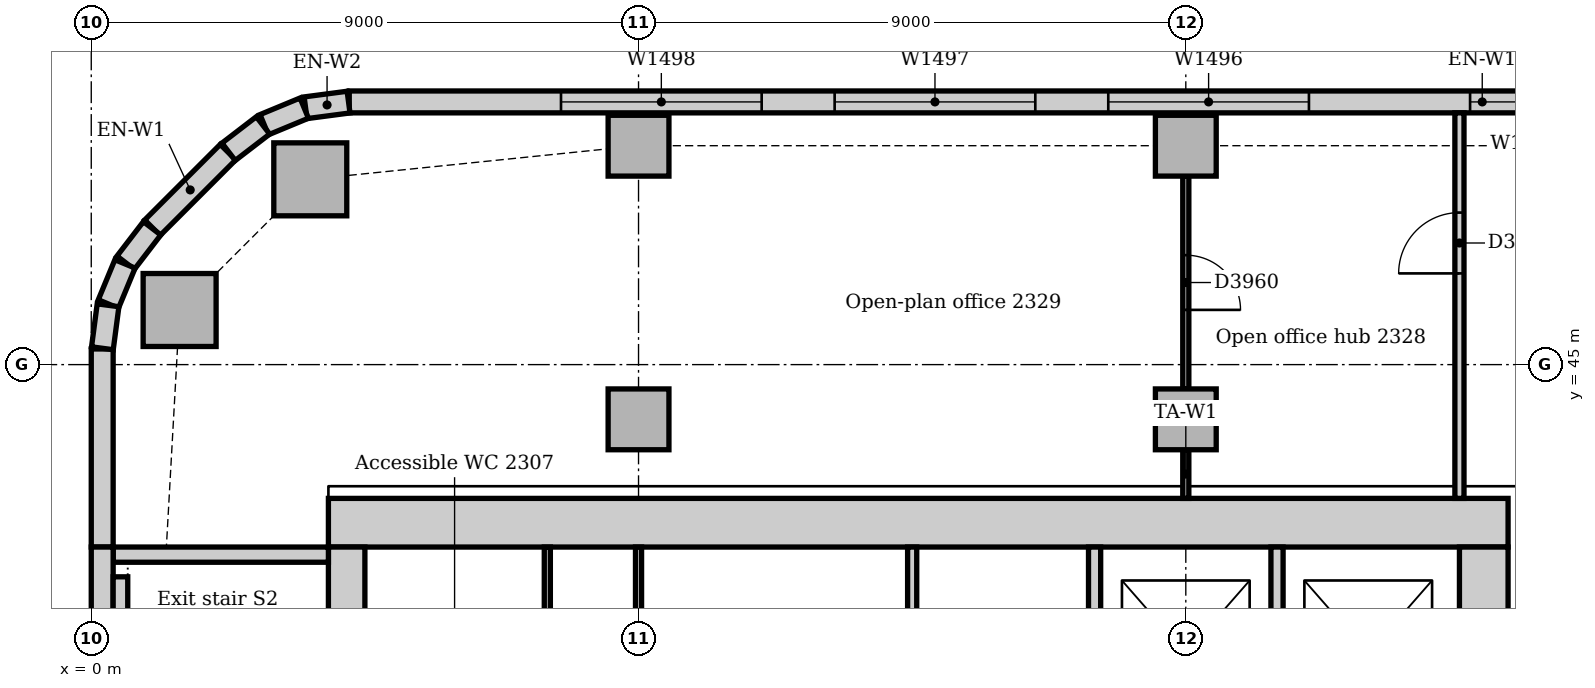
"""IFC4 building model, lengths in metres.
Left out: names, types, materials, properties, quantities, classifications, styles, units other than length and angle.
Written with IfcOpenShell. Run it as: python <this file> out.ifc"""

import sys

from ifc_helpers import new_model, si_unit, direction, frame, frame_2d, origin, origin_2d, place, context, subcontext, project, spatial, rectangle, extrude, element, fill, save


model = new_model("IFC4")
c1 = context("Model", 3, precision=1e-05, world=origin(), true_north=direction((0.0, 1.0)))
c2 = subcontext(c1, "Body", "Model", "MODEL_VIEW")
j1 = project(units=[si_unit("LENGTHUNIT", "METRE"), si_unit("PLANEANGLEUNIT", "RADIAN")], contexts=[c1])
p1 = place(None, origin())
s1 = spatial("IfcSite", under=j1, at=p1, CompositionType="ELEMENT")
p2 = place(p1, origin())
s2 = spatial("IfcBuilding", under=s1, at=p2, CompositionType="ELEMENT")
p3 = place(p2, frame((0.0, 0.0, 100.0)))
s3 = spatial("IfcBuildingStorey", under=s2, at=p3, CompositionType="ELEMENT", Elevation=100.0)
p4 = place(p3, frame((23.3, 42.4, 0.0), z_axis=(0.0, 0.0, 1.0), x_axis=(-1.0, 0.0, 0.0)))
e1 = element("IfcWall", 1, at=p4, inside=s3, PredefinedType="SOLIDWALL", context=c2, shape_type="SweptSolid", body=[
    extrude(rectangle(XDim=19.4, YDim=0.8, at=frame_2d((9.7, 0.0))), origin(), (0.0, 0.0, 1.0), 4.0),
])
p5 = place(p3, frame((22.9, 31.5, 0.0), z_axis=(0.0, 0.0, 1.0), x_axis=(0.0, 1.0, 0.0)))
e2 = element("IfcWall", 2, at=p5, inside=s3, PredefinedType="SOLIDWALL", context=c2, shape_type="SweptSolid", body=[
    extrude(rectangle(XDim=10.5, YDim=0.8, at=frame_2d((5.25, 0.0))), origin(), (0.0, 0.0, 1.0), 4.0),
])
p6 = place(p5, frame((3.15, 0.0, 0.0)))
e3 = element("IfcOpeningElement", 3, at=p6, cuts=e2, PredefinedType="OPENING", context=c2, shape_type="SweptSolid", body=[
    extrude(rectangle(XDim=1.0, YDim=2.1, at=frame_2d((0.5, 1.05))), frame((0.0, 0.41, 0.0), z_axis=(0.0, -1.0, 0.0), x_axis=(1.0, 0.0, 0.0)), (0.0, 0.0, 1.0), 0.82),
])
p7 = place(p5, frame((5.2, 0.0, 0.0)))
e4 = element("IfcOpeningElement", 4, at=p7, cuts=e2, PredefinedType="OPENING", context=c2, shape_type="SweptSolid", body=[
    extrude(rectangle(XDim=1.0, YDim=2.1, at=frame_2d((0.5, 1.05))), frame((0.0, 0.41, 0.0), z_axis=(0.0, -1.0, 0.0), x_axis=(1.0, 0.0, 0.0)), (0.0, 0.0, 1.0), 0.82),
])
p8 = place(p3, frame((4.2, 42.0, 0.0), z_axis=(0.0, 0.0, 1.0), x_axis=(0.0, -1.0, 0.0)))
e5 = element("IfcWall", 5, at=p8, inside=s3, PredefinedType="SOLIDWALL", context=c2, shape_type="SweptSolid", body=[
    extrude(rectangle(XDim=10.5, YDim=0.6, at=frame_2d((5.25, 0.0))), origin(), (0.0, 0.0, 1.0), 4.0),
])
p9 = place(p8, frame((5.3, 0.0, 0.0)))
e6 = element("IfcOpeningElement", 6, at=p9, cuts=e5, PredefinedType="OPENING", context=c2, shape_type="SweptSolid", body=[
    extrude(rectangle(XDim=1.0, YDim=2.1, at=frame_2d((0.5, 1.05))), frame((0.0, 0.31, 0.0), z_axis=(0.0, -1.0, 0.0), x_axis=(1.0, 0.0, 0.0)), (0.0, 0.0, 1.0), 0.62),
])
p10 = place(p3, frame((3.9, 41.875, 0.0), z_axis=(0.0, 0.0, 1.0), x_axis=(-1.0, 0.0, 0.0)))
e7 = element("IfcWall", 7, at=p10, inside=s3, PredefinedType="SOLIDWALL", context=c2, shape_type="SweptSolid", body=[
    extrude(rectangle(XDim=3.54, YDim=0.25, at=frame_2d((1.77, 0.0))), origin(), (0.0, 0.0, 1.0), 4.0),
])
for number, where, z_axis, x_axis in (
    (8, (3.602, 48.047, -0.15), (0.0, 0.0, 1.0), (1.0, 0.0, 0.0)),
    (9, (1.453, 45.898, -0.15), (0.0, 0.0, 1.0), (1.0, 0.0, 0.0)),
):
    element("IfcColumn", number, at=place(p3, frame(where, z_axis=z_axis, x_axis=x_axis)), inside=s3, PredefinedType="COLUMN", context=c2, shape_type="SweptSolid", body=[
        extrude(rectangle(XDim=1.2, YDim=1.2, at=origin_2d()), origin(), (0.0, 0.0, 1.0), 4.0),
    ])
for number, where, z_axis, x_axis in (
    (10, (9.0, 48.6, -0.15), (0.0, 0.0, 1.0), (1.0, 0.0, 0.0)),
    (11, (18.0, 48.6, -0.15), (0.0, 0.0, 1.0), (1.0, 0.0, 0.0)),
):
    element("IfcColumn", number, at=place(p3, frame(where, z_axis=z_axis, x_axis=x_axis)), inside=s3, PredefinedType="COLUMN", context=c2, shape_type="SweptSolid", body=[
        extrude(rectangle(XDim=1.0, YDim=1.0, at=origin_2d()), origin(), (0.0, 0.0, 1.0), 4.0),
    ])
for number, where, z_axis, x_axis in (
    (12, (9.0, 44.1, 0.0), (0.0, 0.0, 1.0), (1.0, 0.0, 0.0)),
    (13, (18.0, 44.1, 0.0), (0.0, 0.0, 1.0), (1.0, 0.0, 0.0)),
):
    element("IfcColumn", number, at=place(p3, frame(where, z_axis=z_axis, x_axis=x_axis)), inside=s3, PredefinedType="COLUMN", context=c2, shape_type="SweptSolid", body=[
        extrude(rectangle(XDim=1.0, YDim=1.0, at=origin_2d()), origin(), (0.0, 0.0, 1.0), 3.85),
    ])
p11 = place(p3, frame((41.507, 49.32, 0.0), z_axis=(0.0, 0.0, 1.0), x_axis=(-1.0, 0.0, 0.0)))
e14 = element("IfcWall", 14, at=p11, inside=s3, PredefinedType="STANDARD", context=c2, shape_type="SweptSolid", body=[
    extrude(rectangle(XDim=37.265, YDim=0.36, at=frame_2d((18.632, 0.0))), origin(), (0.0, 0.0, 1.0), 3.85),
])
p12 = place(p11, frame((3.482, 0.0, 0.9)))
e15 = element("IfcOpeningElement", 15, at=p12, cuts=e14, PredefinedType="OPENING", context=c2, shape_type="SweptSolid", body=[
    extrude(rectangle(XDim=3.3, YDim=1.6, at=frame_2d((1.65, 0.8))), frame((0.0, 0.19, 0.0), z_axis=(0.0, -1.0, 0.0), x_axis=(1.0, 0.0, 0.0)), (0.0, 0.0, 1.0), 0.38),
])
p13 = place(p11, frame((7.982, 0.0, 0.9)))
e16 = element("IfcOpeningElement", 16, at=p13, cuts=e14, PredefinedType="OPENING", context=c2, shape_type="SweptSolid", body=[
    extrude(rectangle(XDim=3.3, YDim=1.6, at=frame_2d((1.65, 0.8))), frame((0.0, 0.19, 0.0), z_axis=(0.0, -1.0, 0.0), x_axis=(1.0, 0.0, 0.0)), (0.0, 0.0, 1.0), 0.38),
])
p14 = place(p11, frame((12.482, 0.0, 0.9)))
e17 = element("IfcOpeningElement", 17, at=p14, cuts=e14, PredefinedType="OPENING", context=c2, shape_type="SweptSolid", body=[
    extrude(rectangle(XDim=3.3, YDim=1.6, at=frame_2d((1.65, 0.8))), frame((0.0, 0.19, 0.0), z_axis=(0.0, -1.0, 0.0), x_axis=(1.0, 0.0, 0.0)), (0.0, 0.0, 1.0), 0.38),
])
p15 = place(p11, frame((17.032, 0.0, 0.9)))
e18 = element("IfcOpeningElement", 18, at=p15, cuts=e14, PredefinedType="OPENING", context=c2, shape_type="SweptSolid", body=[
    extrude(rectangle(XDim=1.8, YDim=1.6, at=frame_2d((0.9, 0.8))), frame((0.0, 0.19, 0.0), z_axis=(0.0, -1.0, 0.0), x_axis=(1.0, 0.0, 0.0)), (0.0, 0.0, 1.0), 0.38),
])
p16 = place(p11, frame((21.482, 0.0, 0.9)))
e19 = element("IfcOpeningElement", 19, at=p16, cuts=e14, PredefinedType="OPENING", context=c2, shape_type="SweptSolid", body=[
    extrude(rectangle(XDim=3.3, YDim=1.6, at=frame_2d((1.65, 0.8))), frame((0.0, 0.19, 0.0), z_axis=(0.0, -1.0, 0.0), x_axis=(1.0, 0.0, 0.0)), (0.0, 0.0, 1.0), 0.38),
])
p17 = place(p11, frame((25.982, 0.0, 0.9)))
e20 = element("IfcOpeningElement", 20, at=p17, cuts=e14, PredefinedType="OPENING", context=c2, shape_type="SweptSolid", body=[
    extrude(rectangle(XDim=3.3, YDim=1.6, at=frame_2d((1.65, 0.8))), frame((0.0, 0.19, 0.0), z_axis=(0.0, -1.0, 0.0), x_axis=(1.0, 0.0, 0.0)), (0.0, 0.0, 1.0), 0.38),
])
p18 = place(p11, frame((30.482, 0.0, 0.9)))
e21 = element("IfcOpeningElement", 21, at=p18, cuts=e14, PredefinedType="OPENING", context=c2, shape_type="SweptSolid", body=[
    extrude(rectangle(XDim=3.3, YDim=1.6, at=frame_2d((1.65, 0.8))), frame((0.0, 0.19, 0.0), z_axis=(0.0, -1.0, 0.0), x_axis=(1.0, 0.0, 0.0)), (0.0, 0.0, 1.0), 0.38),
])
p19 = place(p3, frame((2.249, 48.494, 0.0), z_axis=(0.0, 0.0, 1.0), x_axis=(-0.707106781187, -0.707106781187, 0.0)))
e22 = element("IfcWall", 22, at=p19, inside=s3, PredefinedType="STANDARD", context=c2, shape_type="SweptSolid", body=[
    extrude(rectangle(XDim=1.757, YDim=0.36, at=frame_2d((0.879, 0.0))), origin(), (0.0, 0.0, 1.0), 3.85),
])
p20 = place(p3, frame((0.18, 45.257, 0.0), z_axis=(0.0, 0.0, 1.0), x_axis=(0.0, -1.0, 0.0)))
e23 = element("IfcWall", 23, at=p20, inside=s3, PredefinedType="STANDARD", context=c2, shape_type="SweptSolid", body=[
    extrude(rectangle(XDim=3.257, YDim=0.36, at=frame_2d((1.629, 0.0))), origin(), (0.0, 0.0, 1.0), 3.85),
])
p21 = place(p3, frame((0.18, 42.0, 0.0), z_axis=(0.0, 0.0, 1.0), x_axis=(0.0, -1.0, 0.0)))
e24 = element("IfcWall", 24, at=p21, inside=s3, PredefinedType="STANDARD", context=c2, shape_type="SweptSolid", body=[
    extrude(rectangle(XDim=6.75, YDim=0.36, at=frame_2d((3.375, 0.0))), origin(), (0.0, 0.0, 1.0), 3.85),
])
for number, where, z_axis, x_axis in (
    (25, (4.231, 49.317, 0.0), (0.0, 0.0, 1.0), (-0.991, -0.131, 0.0)),
    (26, (3.503, 49.218, 0.0), (0.0, 0.0, 1.0), (-0.924, -0.383, 0.0)),
):
    element("IfcWall", number, at=place(p3, frame(where, z_axis=z_axis, x_axis=x_axis)), inside=s3, PredefinedType="STANDARD", context=c2, shape_type="SweptSolid", body=[
        extrude(rectangle(XDim=0.713, YDim=0.36, at=frame_2d((0.356, 0.0))), origin(), (0.0, 0.0, 1.0), 3.85),
    ])
for number, where, z_axis, x_axis in (
    (27, (2.825, 48.934, 0.0), (0.0, 0.0, 1.0), (-0.793, -0.609, 0.0)),
    (28, (1.0, 47.241, 0.0), (0.0, 0.0, 1.0), (-0.609, -0.793, 0.0)),
):
    element("IfcWall", number, at=place(p3, frame(where, z_axis=z_axis, x_axis=x_axis)), inside=s3, PredefinedType="STANDARD", context=c2, shape_type="SweptSolid", body=[
        extrude(rectangle(XDim=0.713, YDim=0.36, at=frame_2d((0.357, 0.0))), origin(), (0.0, 0.0, 1.0), 3.85),
    ])
for number, where, z_axis, x_axis in (
    (29, (0.555, 46.656, 0.0), (0.0, 0.0, 1.0), (-0.383, -0.924, 0.0)),
    (30, (0.276, 45.976, 0.0), (0.0, 0.0, 1.0), (-0.131, -0.991, 0.0)),
):
    element("IfcWall", number, at=place(p3, frame(where, z_axis=z_axis, x_axis=x_axis)), inside=s3, PredefinedType="STANDARD", context=c2, shape_type="SweptSolid", body=[
        extrude(rectangle(XDim=0.713, YDim=0.36, at=frame_2d((0.356, 0.0))), origin(), (0.0, 0.0, 1.0), 3.85),
    ])
p22 = place(p3, frame((0.48, 40.13, 0.0), z_axis=(0.0, 0.0, 1.0), x_axis=(0.0, 1.0, 0.0)))
e31 = element("IfcWall", 31, at=p22, inside=s3, PredefinedType="STANDARD", context=c2, shape_type="SweptSolid", body=[
    extrude(rectangle(XDim=1.38, YDim=0.24, at=frame_2d((0.69, 0.0))), origin(), (0.0, 0.0, 1.0), 4.0),
])
for number, where, z_axis, x_axis in (
    (32, (16.5, 38.6, 0.0), (0.0, 0.0, 1.0), (0.0, 1.0, 0.0)),
    (33, (19.5, 38.6, 0.0), (0.0, 0.0, 1.0), (0.0, 1.0, 0.0)),
):
    element("IfcWall", number, at=place(p3, frame(where, z_axis=z_axis, x_axis=x_axis)), inside=s3, PredefinedType="PARTITIONING", context=c2, shape_type="SweptSolid", body=[
        extrude(rectangle(XDim=3.4, YDim=0.2, at=frame_2d((1.7, 0.0))), origin(), (0.0, 0.0, 1.0), 3.85),
    ])
p23 = place(p3, frame((22.5, 42.8, 0.0), z_axis=(0.0, 0.0, 1.0), x_axis=(0.0, 1.0, 0.0)))
e34 = element("IfcWall", 34, at=p23, inside=s3, PredefinedType="PARTITIONING", context=c2, shape_type="SweptSolid", body=[
    extrude(rectangle(XDim=6.34, YDim=0.15, at=frame_2d((3.17, 0.0))), origin(), (0.0, 0.0, 1.0), 3.85),
])
p24 = place(p23, frame((3.7, 0.0, 0.0)))
e35 = element("IfcOpeningElement", 35, at=p24, cuts=e34, PredefinedType="OPENING", context=c2, shape_type="SweptSolid", body=[
    extrude(rectangle(XDim=1.0, YDim=2.1, at=frame_2d((0.5, 1.05))), frame((0.0, 0.085, 0.0), z_axis=(0.0, -1.0, 0.0), x_axis=(1.0, 0.0, 0.0)), (0.0, 0.0, 1.0), 0.17),
])
p25 = place(p3, frame((13.5, 38.575, 0.0), z_axis=(0.0, 0.0, 1.0), x_axis=(0.0, 1.0, 0.0)))
e36 = element("IfcWall", 36, at=p25, inside=s3, PredefinedType="PARTITIONING", context=c2, shape_type="SweptSolid", body=[
    extrude(rectangle(XDim=3.425, YDim=0.15, at=frame_2d((1.712, 0.0))), origin(), (0.0, 0.0, 1.0), 3.85),
])
p26 = place(p3, frame((18.0, 42.8, 0.0), z_axis=(0.0, 0.0, 1.0), x_axis=(0.0, 1.0, 0.0)))
e37 = element("IfcWall", 37, at=p26, inside=s3, PredefinedType="PARTITIONING", context=c2, shape_type="SweptSolid", body=[
    extrude(rectangle(XDim=0.8, YDim=0.1, at=frame_2d((0.4, 0.0))), origin(), (0.0, 0.0, 1.0), 3.85),
])
p27 = place(p3, frame((18.0, 44.6, 0.0), z_axis=(0.0, 0.0, 1.0), x_axis=(0.0, 1.0, 0.0)))
e38 = element("IfcWall", 38, at=p27, inside=s3, PredefinedType="PARTITIONING", context=c2, shape_type="SweptSolid", body=[
    extrude(rectangle(XDim=3.5, YDim=0.1, at=frame_2d((1.75, 0.0))), origin(), (0.0, 0.0, 1.0), 3.652),
])
p28 = place(p27, frame((1.3, 0.0, 0.0)))
e39 = element("IfcOpeningElement", 39, at=p28, cuts=e38, PredefinedType="OPENING", context=c2, shape_type="SweptSolid", body=[
    extrude(rectangle(XDim=0.9, YDim=2.1, at=frame_2d((0.45, 1.05))), frame((0.0, 0.06, 0.0), z_axis=(0.0, -1.0, 0.0), x_axis=(1.0, 0.0, 0.0)), (0.0, 0.0, 1.0), 0.12),
])
for number, where, z_axis, x_axis in (
    (40, (7.5, 38.575, 0.0), (0.0, 0.0, 1.0), (0.0, 1.0, 0.0)),
    (41, (9.0, 38.575, 0.0), (0.0, 0.0, 1.0), (0.0, 1.0, 0.0)),
):
    element("IfcWall", number, at=place(p3, frame(where, z_axis=z_axis, x_axis=x_axis)), inside=s3, PredefinedType="PARTITIONING", context=c2, shape_type="SweptSolid", body=[
        extrude(rectangle(XDim=3.425, YDim=0.1, at=frame_2d((1.712, 0.0))), origin(), (0.0, 0.0, 1.0), 3.85),
    ])
p29 = place(p15, origin())
e42 = element("IfcWindow", 42, at=p29, inside=s3, PartitioningType="SINGLE_PANEL", PredefinedType="WINDOW", context=c2, shape_type="SweptSolid", body=[
    extrude(rectangle(XDim=1.8, YDim=1.6, at=frame_2d((0.9, 0.8))), frame((0.0, 0.13, 0.0), z_axis=(0.0, -1.0, 0.0), x_axis=(1.0, 0.0, 0.0)), (0.0, 0.0, 1.0), 0.06),
])
fill(e18, e42)
p30 = place(p16, origin())
e43 = element("IfcWindow", 43, at=p30, inside=s3, PartitioningType="SINGLE_PANEL", PredefinedType="WINDOW", context=c2, shape_type="SweptSolid", body=[
    extrude(rectangle(XDim=3.3, YDim=1.6, at=frame_2d((1.65, 0.8))), frame((0.0, 0.13, 0.0), z_axis=(0.0, -1.0, 0.0), x_axis=(1.0, 0.0, 0.0)), (0.0, 0.0, 1.0), 0.06),
])
fill(e19, e43)
p31 = place(p17, origin())
e44 = element("IfcWindow", 44, at=p31, inside=s3, PartitioningType="SINGLE_PANEL", PredefinedType="WINDOW", context=c2, shape_type="SweptSolid", body=[
    extrude(rectangle(XDim=3.3, YDim=1.6, at=frame_2d((1.65, 0.8))), frame((0.0, 0.13, 0.0), z_axis=(0.0, -1.0, 0.0), x_axis=(1.0, 0.0, 0.0)), (0.0, 0.0, 1.0), 0.06),
])
fill(e20, e44)
p32 = place(p18, origin())
e45 = element("IfcWindow", 45, at=p32, inside=s3, PartitioningType="SINGLE_PANEL", PredefinedType="WINDOW", context=c2, shape_type="SweptSolid", body=[
    extrude(rectangle(XDim=3.3, YDim=1.6, at=frame_2d((1.65, 0.8))), frame((0.0, 0.13, 0.0), z_axis=(0.0, -1.0, 0.0), x_axis=(1.0, 0.0, 0.0)), (0.0, 0.0, 1.0), 0.06),
])
fill(e21, e45)
p33 = place(p24, origin())
e46 = element("IfcDoor", 46, at=p33, inside=s3, OperationType="SINGLE_SWING_LEFT", PredefinedType="DOOR", context=c2, shape_type="SweptSolid", body=[
    extrude(rectangle(XDim=1.0, YDim=2.1, at=frame_2d((0.5, 1.05))), frame((0.0, 0.025, 0.0), z_axis=(0.0, -1.0, 0.0), x_axis=(1.0, 0.0, 0.0)), (0.0, 0.0, 1.0), 0.05),
])
fill(e35, e46)
p34 = place(p28, frame((0.9, 0.0, 0.0), z_axis=(0.0, 0.0, 1.0), x_axis=(-1.0, 0.0, 0.0)))
e47 = element("IfcDoor", 47, at=p34, inside=s3, OperationType="SINGLE_SWING_RIGHT", PredefinedType="DOOR", context=c2, shape_type="SweptSolid", body=[
    extrude(rectangle(XDim=0.9, YDim=2.1, at=frame_2d((0.45, 1.05))), frame((0.0, 0.025, 0.0), z_axis=(0.0, -1.0, 0.0), x_axis=(1.0, 0.0, 0.0)), (0.0, 0.0, 1.0), 0.05),
])
fill(e39, e47)
save(model, sys.argv[1])
